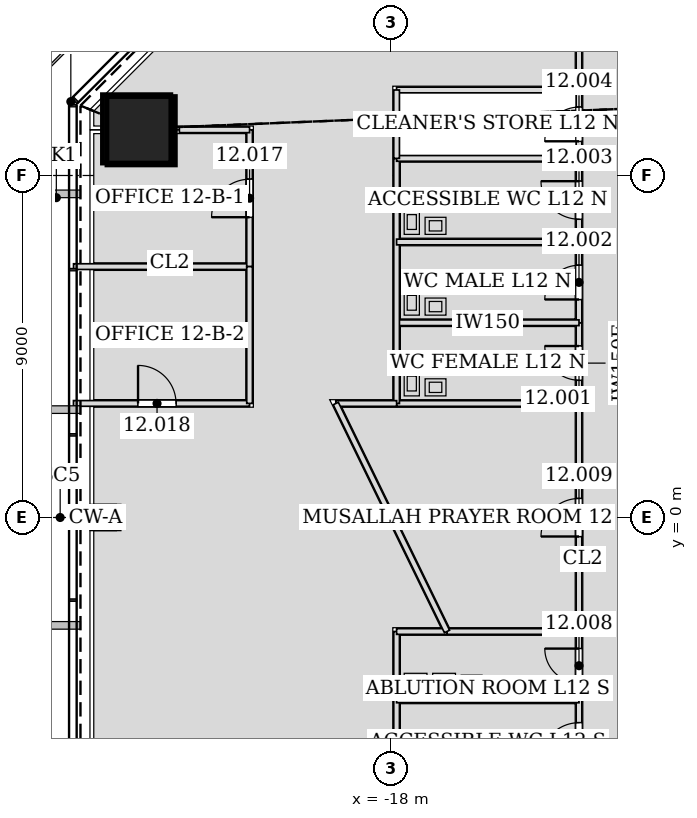
"""IFC4 building model, lengths in metres.
Left out: names, types, materials, properties, quantities, classifications, styles, units other than length and angle.
Written with IfcOpenShell. Run it as: python <this file> out.ifc"""

import sys

from ifc_helpers import new_model, si_unit, direction, frame, frame_2d, origin, origin_2d, place, context, subcontext, project, spatial, rectangle, hollow_rectangle, extrude, element, fill, save


model = new_model("IFC4")
c1 = context("Model", 3, precision=1e-05, world=origin(), true_north=direction((0.0, 1.0)))
c2 = subcontext(c1, "Body", "Model", "MODEL_VIEW")
j1 = project(units=[si_unit("LENGTHUNIT", "METRE"), si_unit("PLANEANGLEUNIT", "RADIAN")], contexts=[c1])
p1 = place(None, origin())
s1 = spatial("IfcSite", under=j1, at=p1, CompositionType="ELEMENT")
p2 = place(p1, origin())
s2 = spatial("IfcBuilding", under=s1, at=p2, CompositionType="ELEMENT")
p3 = place(p2, frame((0.0, 0.0, 58.2)))
s3 = spatial("IfcBuildingStorey", under=s2, at=p3, CompositionType="ELEMENT", Elevation=58.2)
p4 = place(p3, frame((-24.69, 10.227, 0.0), z_axis=(0.028295730207, -0.011736627314, 0.99953069149), x_axis=(0.383133442967, 0.923693003589, 0.0)))
e1 = element("IfcColumn", 1, at=p4, inside=s3, PredefinedType="COLUMN", context=c2, shape_type="SweptSolid", body=[
    extrude(hollow_rectangle(XDim=1.8, YDim=1.8, WallThickness=0.085, at=origin_2d()), origin(), (0.0, 0.0, 1.0), 4.202),
])
p5 = place(p3, frame((-25.568, 0.0, 0.0), z_axis=(0.028297679255, 0.0, 0.99959954049), x_axis=(0.0, 1.0, 0.0)))
e2 = element("IfcColumn", 2, at=p5, inside=s3, PredefinedType="COLUMN", context=c2, shape_type="SweptSolid", body=[
    extrude(hollow_rectangle(XDim=0.6, YDim=0.6, WallThickness=0.032, at=origin_2d()), origin(), (0.0, 0.0, 1.0), 4.202),
])
p6 = place(p3, frame((-13.05, 5.126, 0.0), z_axis=(0.0, 0.0, 1.0), x_axis=(0.0, -1.0, 0.0)))
e3 = element("IfcWall", 3, at=p6, inside=s3, PredefinedType="PARTITIONING", context=c2, shape_type="SweptSolid", body=[
    extrude(rectangle(XDim=2.127, YDim=0.15, at=frame_2d((1.063, 0.0))), origin(), (0.0, 0.0, 1.0), 4.035),
])
p7 = place(p6, frame((0.614, 0.0, 0.0)))
e4 = element("IfcOpeningElement", 4, at=p7, cuts=e3, PredefinedType="OPENING", context=c2, shape_type="SweptSolid", body=[
    extrude(rectangle(XDim=0.9, YDim=2.1, at=frame_2d((0.45, 1.05))), frame((0.0, 0.085, 0.0), z_axis=(0.0, -1.0, 0.0), x_axis=(1.0, 0.0, 0.0)), (0.0, 0.0, 1.0), 0.17),
])
p8 = place(p3, frame((-13.05, 7.251, 0.0), z_axis=(0.0, 0.0, 1.0), x_axis=(0.0, -1.0, 0.0)))
e5 = element("IfcWall", 5, at=p8, inside=s3, PredefinedType="PARTITIONING", context=c2, shape_type="SweptSolid", body=[
    extrude(rectangle(XDim=2.127, YDim=0.15, at=frame_2d((1.063, 0.0))), origin(), (0.0, 0.0, 1.0), 4.035),
])
p9 = place(p8, frame((0.614, 0.0, 0.0)))
e6 = element("IfcOpeningElement", 6, at=p9, cuts=e5, PredefinedType="OPENING", context=c2, shape_type="SweptSolid", body=[
    extrude(rectangle(XDim=0.9, YDim=2.1, at=frame_2d((0.45, 1.05))), frame((0.0, 0.085, 0.0), z_axis=(0.0, -1.0, 0.0), x_axis=(1.0, 0.0, 0.0)), (0.0, 0.0, 1.0), 0.17),
])
p10 = place(p3, frame((-13.05, 9.451, 0.0), z_axis=(0.0, 0.0, 1.0), x_axis=(0.0, -1.0, 0.0)))
e7 = element("IfcWall", 7, at=p10, inside=s3, PredefinedType="PARTITIONING", context=c2, shape_type="SweptSolid", body=[
    extrude(rectangle(XDim=2.202, YDim=0.15, at=frame_2d((1.101, 0.0))), origin(), (0.0, 0.0, 1.0), 4.035),
])
p11 = place(p10, frame((0.601, 0.0, 0.0)))
e8 = element("IfcOpeningElement", 8, at=p11, cuts=e7, PredefinedType="OPENING", context=c2, shape_type="SweptSolid", body=[
    extrude(rectangle(XDim=1.0, YDim=2.1, at=frame_2d((0.5, 1.05))), frame((0.0, 0.085, 0.0), z_axis=(0.0, -1.0, 0.0), x_axis=(1.0, 0.0, 0.0)), (0.0, 0.0, 1.0), 0.17),
])
p12 = place(p3, frame((-13.05, 11.251, 0.0), z_axis=(0.0, 0.0, 1.0), x_axis=(0.0, -1.0, 0.0)))
e9 = element("IfcWall", 9, at=p12, inside=s3, PredefinedType="PARTITIONING", context=c2, shape_type="SweptSolid", body=[
    extrude(rectangle(XDim=1.802, YDim=0.15, at=frame_2d((0.901, 0.0))), origin(), (0.0, 0.0, 1.0), 3.014),
])
p13 = place(p12, frame((0.451, 0.0, 0.0)))
e10 = element("IfcOpeningElement", 10, at=p13, cuts=e9, PredefinedType="OPENING", context=c2, shape_type="SweptSolid", body=[
    extrude(rectangle(XDim=0.9, YDim=2.1, at=frame_2d((0.45, 1.05))), frame((0.0, 0.085, 0.0), z_axis=(0.0, -1.0, 0.0), x_axis=(1.0, 0.0, 0.0)), (0.0, 0.0, 1.0), 0.17),
])
p14 = place(p3, frame((-13.05, -4.799, 0.0), z_axis=(0.0, 0.0, 1.0), x_axis=(0.0, -1.0, 0.0)))
e11 = element("IfcWall", 11, at=p14, inside=s3, PredefinedType="PARTITIONING", context=c2, shape_type="SweptSolid", body=[
    extrude(rectangle(XDim=2.202, YDim=0.15, at=frame_2d((1.101, 0.0))), origin(), (0.0, 0.0, 1.0), 4.035),
])
p15 = place(p14, frame((0.601, 0.0, 0.0)))
e12 = element("IfcOpeningElement", 12, at=p15, cuts=e11, PredefinedType="OPENING", context=c2, shape_type="SweptSolid", body=[
    extrude(rectangle(XDim=1.0, YDim=2.1, at=frame_2d((0.5, 1.05))), frame((0.0, 0.085, 0.0), z_axis=(0.0, -1.0, 0.0), x_axis=(1.0, 0.0, 0.0)), (0.0, 0.0, 1.0), 0.17),
])
p16 = place(p3, frame((-13.05, -2.999, 0.0), z_axis=(0.0, 0.0, 1.0), x_axis=(0.0, -1.0, 0.0)))
e13 = element("IfcWall", 13, at=p16, inside=s3, PredefinedType="PARTITIONING", context=c2, shape_type="SweptSolid", body=[
    extrude(rectangle(XDim=1.802, YDim=0.15, at=frame_2d((0.901, 0.0))), origin(), (0.0, 0.0, 1.0), 4.035),
])
p17 = place(p16, frame((0.451, 0.0, 0.0)))
e14 = element("IfcOpeningElement", 14, at=p17, cuts=e13, PredefinedType="OPENING", context=c2, shape_type="SweptSolid", body=[
    extrude(rectangle(XDim=0.9, YDim=2.1, at=frame_2d((0.45, 1.05))), frame((0.0, 0.085, 0.0), z_axis=(0.0, -1.0, 0.0), x_axis=(1.0, 0.0, 0.0)), (0.0, 0.0, 1.0), 0.17),
])
p18 = place(p3, frame((-13.05, 3.001, 0.0), z_axis=(0.0, 0.0, 1.0), x_axis=(0.0, -1.0, 0.0)))
e15 = element("IfcWall", 15, at=p18, inside=s3, PredefinedType="PARTITIONING", context=c2, shape_type="SweptSolid", body=[
    extrude(rectangle(XDim=6.002, YDim=0.15, at=frame_2d((3.001, 0.0))), origin(), (0.0, 0.0, 1.0), 2.984),
])
p19 = place(p18, frame((2.501, 0.0, 0.0)))
e16 = element("IfcOpeningElement", 16, at=p19, cuts=e15, PredefinedType="OPENING", context=c2, shape_type="SweptSolid", body=[
    extrude(rectangle(XDim=1.0, YDim=2.1, at=frame_2d((0.5, 1.05))), frame((0.0, 0.085, 0.0), z_axis=(0.0, -1.0, 0.0), x_axis=(1.0, 0.0, 0.0)), (0.0, 0.0, 1.0), 0.17),
])
p20 = place(p3, frame((-13.05, 13.05, 0.0), z_axis=(0.0, 0.0, 1.0), x_axis=(0.0, -1.0, 0.0)))
e17 = element("IfcWall", 17, at=p20, inside=s3, PredefinedType="PARTITIONING", context=c2, shape_type="SweptSolid", body=[
    extrude(rectangle(XDim=1.801, YDim=0.15, at=frame_2d((0.9, 0.0))), origin(), (0.0, 0.0, 1.0), 3.167),
])
for number, where, z_axis, x_axis in (
    (18, (-13.05, 5.125, 0.0), (0.0, 0.0, 1.0), (-1.0, 0.0, 0.0)),
    (19, (-17.85, 3.0, 0.0), (0.0, 0.0, 1.0), (1.0, 0.0, 0.0)),
):
    element("IfcWall", number, at=place(p3, frame(where, z_axis=z_axis, x_axis=x_axis)), inside=s3, PredefinedType="PARTITIONING", context=c2, shape_type="SweptSolid", body=[
        extrude(rectangle(XDim=4.8, YDim=0.15, at=frame_2d((2.4, 0.0))), origin(), (0.0, 0.0, 1.0), 3.423),
    ])
p21 = place(p3, frame((-17.85, 3.0, 0.0), z_axis=(0.0, 0.0, 1.0), x_axis=(0.0, 1.0, 0.0)))
e20 = element("IfcWall", 20, at=p21, inside=s3, PredefinedType="PARTITIONING", context=c2, shape_type="SweptSolid", body=[
    extrude(rectangle(XDim=6.45, YDim=0.15, at=frame_2d((3.225, 0.0))), origin(), (0.0, 0.0, 1.0), 4.035),
])
for number, where, z_axis, x_axis in (
    (21, (-13.05, 7.25, 0.0), (0.0, 0.0, 1.0), (-1.0, 0.0, 0.0)),
    (22, (-13.05, 9.45, 0.0), (0.0, 0.0, 1.0), (-1.0, 0.0, 0.0)),
):
    element("IfcWall", number, at=place(p3, frame(where, z_axis=z_axis, x_axis=x_axis)), inside=s3, PredefinedType="PARTITIONING", context=c2, shape_type="SweptSolid", body=[
        extrude(rectangle(XDim=4.8, YDim=0.15, at=frame_2d((2.4, 0.0))), origin(), (0.0, 0.0, 1.0), 3.423),
    ])
p22 = place(p3, frame((-13.05, 11.25, 0.0), z_axis=(0.0, 0.0, 1.0), x_axis=(-1.0, 0.0, 0.0)))
e23 = element("IfcWall", 23, at=p22, inside=s3, PredefinedType="PARTITIONING", context=c2, shape_type="SweptSolid", body=[
    extrude(rectangle(XDim=4.8, YDim=0.15, at=frame_2d((2.4, 0.0))), origin(), (0.0, 0.0, 1.0), 3.715),
])
p23 = place(p3, frame((-17.85, 11.25, 0.0), z_axis=(0.0, 0.0, 1.0), x_axis=(0.0, -1.0, 0.0)))
e24 = element("IfcWall", 24, at=p23, inside=s3, PredefinedType="PARTITIONING", context=c2, shape_type="SweptSolid", body=[
    extrude(rectangle(XDim=1.8, YDim=0.15, at=frame_2d((0.9, 0.0))), origin(), (0.0, 0.0, 1.0), 3.014),
])
p24 = place(p3, frame((-17.85, -9.125, 0.0), z_axis=(0.0, 0.0, 1.0), x_axis=(0.0, 1.0, 0.0)))
e25 = element("IfcWall", 25, at=p24, inside=s3, PredefinedType="PARTITIONING", context=c2, shape_type="SweptSolid", body=[
    extrude(rectangle(XDim=6.125, YDim=0.15, at=frame_2d((3.062, 0.0))), origin(), (0.0, 0.0, 1.0), 4.035),
])
p25 = place(p3, frame((-13.05, -4.8, 0.0), z_axis=(0.0, 0.0, 1.0), x_axis=(-1.0, 0.0, 0.0)))
e26 = element("IfcWall", 26, at=p25, inside=s3, PredefinedType="PARTITIONING", context=c2, shape_type="SweptSolid", body=[
    extrude(rectangle(XDim=4.8, YDim=0.15, at=frame_2d((2.4, 0.0))), origin(), (0.0, 0.0, 1.0), 3.423),
])
p26 = place(p3, frame((-13.05, -3.0, 0.0), z_axis=(0.0, 0.0, 1.0), x_axis=(-1.0, 0.0, 0.0)))
e27 = element("IfcWall", 27, at=p26, inside=s3, PredefinedType="PARTITIONING", context=c2, shape_type="SweptSolid", body=[
    extrude(rectangle(XDim=3.475, YDim=0.15, at=frame_2d((1.737, 0.0))), origin(), (0.0, 0.0, 1.0), 3.423),
])
p27 = place(p3, frame((-16.522, -3.0, 0.0), z_axis=(0.0, 0.0, 1.0), x_axis=(-1.0, 0.0, 0.0)))
e28 = element("IfcWall", 28, at=p27, inside=s3, PredefinedType="PARTITIONING", context=c2, shape_type="SweptSolid", body=[
    extrude(rectangle(XDim=1.328, YDim=0.15, at=frame_2d((0.664, 0.0))), origin(), (0.0, 0.0, 1.0), 3.565),
])
p28 = place(p3, frame((-17.849, 3.0, 0.0), z_axis=(0.0, 0.0, 1.0), x_axis=(-1.0, 0.0, 0.0)))
e29 = element("IfcWall", 29, at=p28, inside=s3, PredefinedType="PARTITIONING", context=c2, shape_type="SweptSolid", body=[
    extrude(rectangle(XDim=1.601, YDim=0.15, at=frame_2d((0.8, 0.0))), origin(), (0.0, 0.0, 1.0), 4.035),
])
p29 = place(p3, frame((-19.45, 3.0, 0.0), z_axis=(0.0, 0.0, 1.0), x_axis=(0.43835589904, -0.898801482963, 0.0)))
e30 = element("IfcWall", 30, at=p29, inside=s3, PredefinedType="PARTITIONING", context=c2, shape_type="SweptSolid", body=[
    extrude(rectangle(XDim=6.676, YDim=0.15, at=frame_2d((3.338, 0.0))), origin(), (0.0, 0.0, 1.0), 2.984),
])
p30 = place(p3, frame((-26.35, 6.602, 0.0), z_axis=(0.0, 0.0, 1.0), x_axis=(1.0, 0.0, 0.0)))
e31 = element("IfcWall", 31, at=p30, inside=s3, PredefinedType="PARTITIONING", context=c2, shape_type="SweptSolid", body=[
    extrude(rectangle(XDim=4.632, YDim=0.15, at=frame_2d((2.316, 0.0))), origin(), (0.0, 0.0, 1.0), 3.423),
])
p31 = place(p3, frame((-21.718, 6.602, 0.0), z_axis=(0.0, 0.0, 1.0), x_axis=(0.0, 1.0, 0.0)))
e32 = element("IfcWall", 32, at=p31, inside=s3, PredefinedType="PARTITIONING", context=c2, shape_type="SweptSolid", body=[
    extrude(rectangle(XDim=3.6, YDim=0.15, at=frame_2d((1.8, 0.0))), origin(), (0.0, 0.0, 1.0), 3.014),
])
p32 = place(p31, frame((1.3, 0.0, 0.0)))
e33 = element("IfcOpeningElement", 33, at=p32, cuts=e32, PredefinedType="OPENING", context=c2, shape_type="SweptSolid", body=[
    extrude(rectangle(XDim=1.0, YDim=2.1, at=frame_2d((0.5, 1.05))), frame((0.0, 0.085, 0.0), z_axis=(0.0, -1.0, 0.0), x_axis=(1.0, 0.0, 0.0)), (0.0, 0.0, 1.0), 0.17),
])
p33 = place(p3, frame((-21.718, 10.202, 0.0), z_axis=(0.0, 0.0, 1.0), x_axis=(-1.0, 0.0, 0.0)))
e34 = element("IfcWall", 34, at=p33, inside=s3, PredefinedType="PARTITIONING", context=c2, shape_type="SweptSolid", body=[
    extrude(rectangle(XDim=1.848, YDim=0.15, at=frame_2d((0.924, 0.0))), origin(), (0.0, 0.0, 1.0), 3.014),
])
p34 = place(p3, frame((-26.352, 3.002, 0.0), z_axis=(0.0, 0.0, 1.0), x_axis=(1.0, 0.0, 0.0)))
e35 = element("IfcWall", 35, at=p34, inside=s3, PredefinedType="PARTITIONING", context=c2, shape_type="SweptSolid", body=[
    extrude(rectangle(XDim=4.634, YDim=0.15, at=frame_2d((2.317, 0.0))), origin(), (0.0, 0.0, 1.0), 3.423),
])
p35 = place(p34, frame((1.699, 0.0, 0.0)))
e36 = element("IfcOpeningElement", 36, at=p35, cuts=e35, PredefinedType="OPENING", context=c2, shape_type="SweptSolid", body=[
    extrude(rectangle(XDim=1.0, YDim=2.1, at=frame_2d((0.5, 1.05))), frame((0.0, 0.085, 0.0), z_axis=(0.0, -1.0, 0.0), x_axis=(1.0, 0.0, 0.0)), (0.0, 0.0, 1.0), 0.17),
])
p36 = place(p3, frame((-21.718, 3.002, 0.0), z_axis=(0.0, 0.0, 1.0), x_axis=(0.0, 1.0, 0.0)))
e37 = element("IfcWall", 37, at=p36, inside=s3, PredefinedType="PARTITIONING", context=c2, shape_type="SweptSolid", body=[
    extrude(rectangle(XDim=3.6, YDim=0.15, at=frame_2d((1.8, 0.0))), origin(), (0.0, 0.0, 1.0), 4.035),
])
p37 = place(p7, frame((0.9, 0.0, 0.0), z_axis=(0.0, 0.0, 1.0), x_axis=(-1.0, 0.0, 0.0)))
e38 = element("IfcDoor", 38, at=p37, inside=s3, OperationType="SINGLE_SWING_RIGHT", PredefinedType="DOOR", context=c2, shape_type="SweptSolid", body=[
    extrude(rectangle(XDim=0.9, YDim=2.1, at=frame_2d((0.45, 1.05))), frame((0.0, 0.025, 0.0), z_axis=(0.0, -1.0, 0.0), x_axis=(1.0, 0.0, 0.0)), (0.0, 0.0, 1.0), 0.05),
])
fill(e4, e38)
p38 = place(p9, frame((0.9, 0.0, 0.0), z_axis=(0.0, 0.0, 1.0), x_axis=(-1.0, 0.0, 0.0)))
e39 = element("IfcDoor", 39, at=p38, inside=s3, OperationType="SINGLE_SWING_LEFT", PredefinedType="DOOR", context=c2, shape_type="SweptSolid", body=[
    extrude(rectangle(XDim=0.9, YDim=2.1, at=frame_2d((0.45, 1.05))), frame((0.0, 0.025, 0.0), z_axis=(0.0, -1.0, 0.0), x_axis=(1.0, 0.0, 0.0)), (0.0, 0.0, 1.0), 0.05),
])
fill(e6, e39)
p39 = place(p11, frame((1.0, 0.0, 0.0), z_axis=(0.0, 0.0, 1.0), x_axis=(-1.0, 0.0, 0.0)))
e40 = element("IfcDoor", 40, at=p39, inside=s3, OperationType="SINGLE_SWING_RIGHT", PredefinedType="DOOR", context=c2, shape_type="SweptSolid", body=[
    extrude(rectangle(XDim=1.0, YDim=2.1, at=frame_2d((0.5, 1.05))), frame((0.0, 0.025, 0.0), z_axis=(0.0, -1.0, 0.0), x_axis=(1.0, 0.0, 0.0)), (0.0, 0.0, 1.0), 0.05),
])
fill(e8, e40)
p40 = place(p13, frame((0.9, 0.0, 0.0), z_axis=(0.0, 0.0, 1.0), x_axis=(-1.0, 0.0, 0.0)))
e41 = element("IfcDoor", 41, at=p40, inside=s3, OperationType="SINGLE_SWING_LEFT", PredefinedType="DOOR", context=c2, shape_type="SweptSolid", body=[
    extrude(rectangle(XDim=0.9, YDim=2.1, at=frame_2d((0.45, 1.05))), frame((0.0, 0.025, 0.0), z_axis=(0.0, -1.0, 0.0), x_axis=(1.0, 0.0, 0.0)), (0.0, 0.0, 1.0), 0.05),
])
fill(e10, e41)
p41 = place(p15, frame((1.0, 0.0, 0.0), z_axis=(0.0, 0.0, 1.0), x_axis=(-1.0, 0.0, 0.0)))
e42 = element("IfcDoor", 42, at=p41, inside=s3, OperationType="SINGLE_SWING_LEFT", PredefinedType="DOOR", context=c2, shape_type="SweptSolid", body=[
    extrude(rectangle(XDim=1.0, YDim=2.1, at=frame_2d((0.5, 1.05))), frame((0.0, 0.025, 0.0), z_axis=(0.0, -1.0, 0.0), x_axis=(1.0, 0.0, 0.0)), (0.0, 0.0, 1.0), 0.05),
])
fill(e12, e42)
p42 = place(p17, frame((0.9, 0.0, 0.0), z_axis=(0.0, 0.0, 1.0), x_axis=(-1.0, 0.0, 0.0)))
e43 = element("IfcDoor", 43, at=p42, inside=s3, OperationType="SINGLE_SWING_RIGHT", PredefinedType="DOOR", context=c2, shape_type="SweptSolid", body=[
    extrude(rectangle(XDim=0.9, YDim=2.1, at=frame_2d((0.45, 1.05))), frame((0.0, 0.025, 0.0), z_axis=(0.0, -1.0, 0.0), x_axis=(1.0, 0.0, 0.0)), (0.0, 0.0, 1.0), 0.05),
])
fill(e14, e43)
p43 = place(p19, frame((1.0, 0.0, 0.0), z_axis=(0.0, 0.0, 1.0), x_axis=(-1.0, 0.0, 0.0)))
e44 = element("IfcDoor", 44, at=p43, inside=s3, OperationType="SINGLE_SWING_LEFT", PredefinedType="DOOR", context=c2, shape_type="SweptSolid", body=[
    extrude(rectangle(XDim=1.0, YDim=2.1, at=frame_2d((0.5, 1.05))), frame((0.0, 0.025, 0.0), z_axis=(0.0, -1.0, 0.0), x_axis=(1.0, 0.0, 0.0)), (0.0, 0.0, 1.0), 0.05),
])
fill(e16, e44)
p44 = place(p32, origin())
e45 = element("IfcDoor", 45, at=p44, inside=s3, OperationType="SINGLE_SWING_LEFT", PredefinedType="DOOR", context=c2, shape_type="SweptSolid", body=[
    extrude(rectangle(XDim=1.0, YDim=2.1, at=frame_2d((0.5, 1.05))), frame((0.0, 0.025, 0.0), z_axis=(0.0, -1.0, 0.0), x_axis=(1.0, 0.0, 0.0)), (0.0, 0.0, 1.0), 0.05),
])
fill(e33, e45)
p45 = place(p35, origin())
e46 = element("IfcDoor", 46, at=p45, inside=s3, OperationType="SINGLE_SWING_LEFT", PredefinedType="DOOR", context=c2, shape_type="SweptSolid", body=[
    extrude(rectangle(XDim=1.0, YDim=2.1, at=frame_2d((0.5, 1.05))), frame((0.0, 0.025, 0.0), z_axis=(0.0, -1.0, 0.0), x_axis=(1.0, 0.0, 0.0)), (0.0, 0.0, 1.0), 0.05),
])
fill(e36, e46)
save(model, sys.argv[1])
